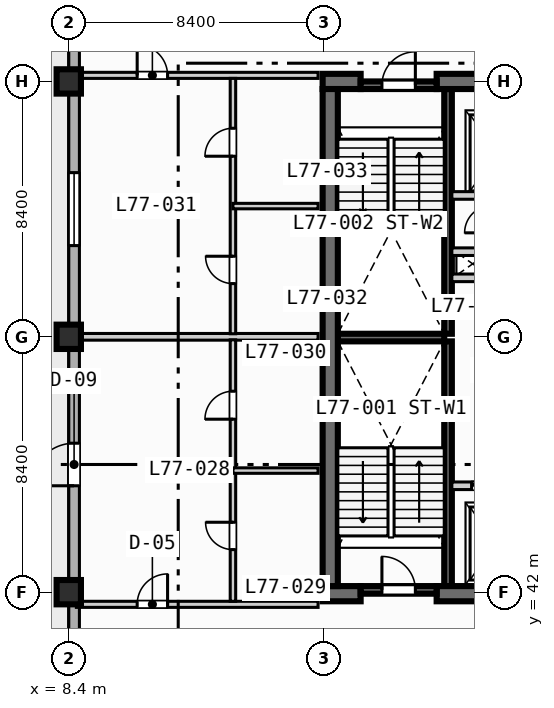
"""IFC4 building model, lengths in metres.
Left out: names, types, materials, properties, quantities, classifications, styles, units other than length and angle.
Written with IfcOpenShell. Run it as: python <this file> out.ifc"""

import sys

from ifc_helpers import new_model, si_unit, direction, frame, frame_2d, origin, origin_2d, place, context, subcontext, project, spatial, rectangle, extrude, element, fill, save


model = new_model("IFC4")
c1 = context("Model", 3, precision=1e-05, world=origin(), true_north=direction((0.0, 1.0)))
c2 = subcontext(c1, "Body", "Model", "MODEL_VIEW")
j1 = project(units=[si_unit("LENGTHUNIT", "METRE"), si_unit("PLANEANGLEUNIT", "RADIAN")], contexts=[c1])
p1 = place(None, origin())
s1 = spatial("IfcSite", under=j1, at=p1, CompositionType="ELEMENT")
p2 = place(p1, origin())
s2 = spatial("IfcBuilding", under=s1, at=p2, CompositionType="ELEMENT")
p3 = place(p2, frame((0.0, 0.0, 312.5)))
s3 = spatial("IfcBuildingStorey", under=s2, at=p3, CompositionType="ELEMENT", Elevation=312.5)
for number, where, z_axis, x_axis in (
    (1, (20.875, 42.2, 0.0), (0.0, 0.0, 1.0), (0.0, 1.0, 0.0)),
    (2, (20.875, 50.5, 0.0), (0.0, 0.0, 1.0), (0.0, 1.0, 0.0)),
):
    element("IfcWall", number, at=place(p3, frame(where, z_axis=z_axis, x_axis=x_axis)), inside=s3, PredefinedType="SOLIDWALL", context=c2, shape_type="SweptSolid", body=[
        extrude(rectangle(XDim=8.05, YDim=0.25, at=frame_2d((4.025, 0.0))), origin(), (0.0, 0.0, 1.0), 3.67),
    ])
p4 = place(p3, frame((17.25, 50.375, 0.0), z_axis=(0.0, 0.0, 1.0), x_axis=(1.0, 0.0, 0.0)))
e3 = element("IfcWall", 3, at=p4, inside=s3, PredefinedType="SOLIDWALL", context=c2, shape_type="SweptSolid", body=[
    extrude(rectangle(XDim=3.5, YDim=0.25, at=frame_2d((1.75, 0.0))), origin(), (0.0, 0.0, 1.0), 3.67),
])
p5 = place(p3, frame((16.75, 41.95, 0.0), z_axis=(0.0, 0.0, 1.0), x_axis=(1.0, 0.0, 0.0)))
e4 = element("IfcWall", 4, at=p5, inside=s3, PredefinedType="SHEAR", context=c2, shape_type="SweptSolid", body=[
    extrude(rectangle(XDim=1.25, YDim=0.5, at=frame_2d((0.625, 0.0))), origin(), (0.0, 0.0, 1.0), 3.67),
])
p6 = place(p3, frame((20.5, 41.95, 0.0), z_axis=(0.0, 0.0, 1.0), x_axis=(1.0, 0.0, 0.0)))
e5 = element("IfcWall", 5, at=p6, inside=s3, PredefinedType="SHEAR", context=c2, shape_type="SweptSolid", body=[
    extrude(rectangle(XDim=4.95, YDim=0.5, at=frame_2d((2.475, 0.0))), origin(), (0.0, 0.0, 1.0), 3.67),
])
p7 = place(p3, frame((16.75, 58.8, 0.0), z_axis=(0.0, 0.0, 1.0), x_axis=(1.0, 0.0, 0.0)))
e6 = element("IfcWall", 6, at=p7, inside=s3, PredefinedType="SHEAR", context=c2, shape_type="SweptSolid", body=[
    extrude(rectangle(XDim=1.25, YDim=0.5, at=frame_2d((0.625, 0.0))), origin(), (0.0, 0.0, 1.0), 3.67),
])
p8 = place(p3, frame((20.5, 58.8, 0.0), z_axis=(0.0, 0.0, 1.0), x_axis=(1.0, 0.0, 0.0)))
e7 = element("IfcWall", 7, at=p8, inside=s3, PredefinedType="SHEAR", context=c2, shape_type="SweptSolid", body=[
    extrude(rectangle(XDim=4.95, YDim=0.5, at=frame_2d((2.475, 0.0))), origin(), (0.0, 0.0, 1.0), 3.67),
])
p9 = place(p3, frame((17.0, 42.2, 0.0), z_axis=(0.0, 0.0, 1.0), x_axis=(0.0, 1.0, 0.0)))
e8 = element("IfcWall", 8, at=p9, inside=s3, PredefinedType="SHEAR", context=c2, shape_type="SweptSolid", body=[
    extrude(rectangle(XDim=16.35, YDim=0.5, at=frame_2d((8.175, 0.0))), origin(), (0.0, 0.0, 1.0), 3.67),
])
for number, where, z_axis, x_axis in (
    (9, (8.4, 42.0, 0.0), (0.0, 0.0, 1.0), (1.0, 0.0, 0.0)),
    (10, (8.4, 50.4, 0.0), (0.0, 0.0, 1.0), (1.0, 0.0, 0.0)),
    (11, (8.4, 58.8, 0.0), (0.0, 0.0, 1.0), (1.0, 0.0, 0.0)),
):
    element("IfcColumn", number, at=place(p3, frame(where, z_axis=z_axis, x_axis=x_axis)), inside=s3, PredefinedType="COLUMN", context=c2, shape_type="SweptSolid", body=[
        extrude(rectangle(XDim=0.8, YDim=0.8, at=origin_2d()), origin(), (0.0, 0.0, 1.0), 3.9),
    ])
p10 = place(p3, frame((8.575, 11.575, 0.0), z_axis=(0.0, 0.0, 1.0), x_axis=(0.0, 1.0, 0.0)))
e12 = element("IfcWall", 12, at=p10, inside=s3, PredefinedType="STANDARD", context=c2, shape_type="SweptSolid", body=[
    extrude(rectangle(XDim=60.85, YDim=0.35, at=frame_2d((30.425, 0.0))), origin(), (0.0, 0.0, 1.0), 3.67),
])
p11 = place(p10, frame((33.925, 0.0, 0.0)))
e13 = element("IfcOpeningElement", 13, at=p11, cuts=e12, PredefinedType="OPENING", context=c2, shape_type="SweptSolid", body=[
    extrude(rectangle(XDim=1.4, YDim=2.2, at=frame_2d((0.7, 1.1))), frame((0.0, 0.185, 0.0), z_axis=(0.0, -1.0, 0.0), x_axis=(1.0, 0.0, 0.0)), (0.0, 0.0, 1.0), 0.37),
])
p12 = place(p10, frame((25.025, 0.0, 0.85)))
e14 = element("IfcOpeningElement", 14, at=p12, cuts=e12, PredefinedType="OPENING", context=c2, shape_type="SweptSolid", body=[
    extrude(rectangle(XDim=2.4, YDim=1.95, at=frame_2d((1.2, 0.975))), frame((0.0, 0.185, 0.0), z_axis=(0.0, -1.0, 0.0), x_axis=(1.0, 0.0, 0.0)), (0.0, 0.0, 1.0), 0.37),
])
p13 = place(p10, frame((41.825, 0.0, 0.85)))
e15 = element("IfcOpeningElement", 15, at=p13, cuts=e12, PredefinedType="OPENING", context=c2, shape_type="SweptSolid", body=[
    extrude(rectangle(XDim=2.4, YDim=1.95, at=frame_2d((1.2, 0.975))), frame((0.0, 0.185, 0.0), z_axis=(0.0, -1.0, 0.0), x_axis=(1.0, 0.0, 0.0)), (0.0, 0.0, 1.0), 0.37),
])
p14 = place(p10, frame((19.25, 0.0, 0.85)))
e16 = element("IfcOpeningElement", 16, at=p14, cuts=e12, PredefinedType="OPENING", context=c2, shape_type="SweptSolid", body=[
    extrude(rectangle(XDim=1.8, YDim=1.8, at=frame_2d((0.9, 0.9))), frame((0.0, 0.185, 0.0), z_axis=(0.0, -1.0, 0.0), x_axis=(1.0, 0.0, 0.0)), (0.0, 0.0, 1.0), 0.37),
])
p15 = place(p3, frame((18.0, 42.075, 0.0), z_axis=(0.0, 0.0, 1.0), x_axis=(1.0, 0.0, 0.0)))
e17 = element("IfcWall", 17, at=p15, inside=s3, PredefinedType="SOLIDWALL", context=c2, shape_type="SweptSolid", body=[
    extrude(rectangle(XDim=2.5, YDim=0.25, at=frame_2d((1.25, 0.0))), origin(), (0.0, 0.0, 1.0), 3.67),
])
p16 = place(p15, frame((0.7, 0.0, 0.0)))
e18 = element("IfcOpeningElement", 18, at=p16, cuts=e17, PredefinedType="OPENING", context=c2, shape_type="SweptSolid", body=[
    extrude(rectangle(XDim=1.1, YDim=2.15, at=frame_2d((0.55, 1.075))), frame((0.0, 0.135, 0.0), z_axis=(0.0, -1.0, 0.0), x_axis=(1.0, 0.0, 0.0)), (0.0, 0.0, 1.0), 0.27),
])
p17 = place(p3, frame((18.0, 58.675, 0.0), z_axis=(0.0, 0.0, 1.0), x_axis=(1.0, 0.0, 0.0)))
e19 = element("IfcWall", 19, at=p17, inside=s3, PredefinedType="SOLIDWALL", context=c2, shape_type="SweptSolid", body=[
    extrude(rectangle(XDim=2.5, YDim=0.25, at=frame_2d((1.25, 0.0))), origin(), (0.0, 0.0, 1.0), 3.67),
])
p18 = place(p17, frame((0.7, 0.0, 0.0)))
e20 = element("IfcOpeningElement", 20, at=p18, cuts=e19, PredefinedType="OPENING", context=c2, shape_type="SweptSolid", body=[
    extrude(rectangle(XDim=1.1, YDim=2.15, at=frame_2d((0.55, 1.075))), frame((0.0, 0.135, 0.0), z_axis=(0.0, -1.0, 0.0), x_axis=(1.0, 0.0, 0.0)), (0.0, 0.0, 1.0), 0.27),
])
p19 = place(p3, frame((21.0, 45.5, 0.0), z_axis=(0.0, 0.0, 1.0), x_axis=(1.0, 0.0, 0.0)))
e21 = element("IfcWall", 21, at=p19, inside=s3, PredefinedType="SOLIDWALL", context=c2, shape_type="SweptSolid", body=[
    extrude(rectangle(XDim=4.15, YDim=0.25, at=frame_2d((2.075, 0.0))), origin(), (0.0, 0.0, 1.0), 3.67),
])
p20 = place(p19, frame((0.65, 0.0, 0.0)))
e22 = element("IfcOpeningElement", 22, at=p20, cuts=e21, PredefinedType="OPENING", context=c2, shape_type="SweptSolid", body=[
    extrude(rectangle(XDim=1.1, YDim=2.15, at=frame_2d((0.55, 1.075))), frame((0.0, 0.135, 0.0), z_axis=(0.0, -1.0, 0.0), x_axis=(1.0, 0.0, 0.0)), (0.0, 0.0, 1.0), 0.27),
])
p21 = place(p3, frame((21.0, 52.34, 0.0), z_axis=(0.0, 0.0, 1.0), x_axis=(1.0, 0.0, 0.0)))
e23 = element("IfcWall", 23, at=p21, inside=s3, PredefinedType="SOLIDWALL", context=c2, shape_type="SweptSolid", body=[
    extrude(rectangle(XDim=3.95, YDim=0.25, at=frame_2d((1.975, 0.0))), origin(), (0.0, 0.0, 1.0), 3.67),
])
p22 = place(p3, frame((21.0, 55.05, 0.0), z_axis=(0.0, 0.0, 1.0), x_axis=(1.0, 0.0, 0.0)))
e24 = element("IfcWall", 24, at=p22, inside=s3, PredefinedType="SOLIDWALL", context=c2, shape_type="SweptSolid", body=[
    extrude(rectangle(XDim=4.15, YDim=0.25, at=frame_2d((2.075, 0.0))), origin(), (0.0, 0.0, 1.0), 3.67),
])
p23 = place(p22, frame((1.85, 0.0, 0.0)))
e25 = element("IfcOpeningElement", 25, at=p23, cuts=e24, PredefinedType="OPENING", context=c2, shape_type="SweptSolid", body=[
    extrude(rectangle(XDim=1.1, YDim=2.15, at=frame_2d((0.55, 1.075))), frame((0.0, 0.135, 0.0), z_axis=(0.0, -1.0, 0.0), x_axis=(1.0, 0.0, 0.0)), (0.0, 0.0, 1.0), 0.27),
])
p24 = place(p3, frame((21.0, 53.2, 0.0), z_axis=(0.0, 0.0, 1.0), x_axis=(1.0, 0.0, 0.0)))
e26 = element("IfcWall", 26, at=p24, inside=s3, PredefinedType="SOLIDWALL", context=c2, shape_type="SweptSolid", body=[
    extrude(rectangle(XDim=1.3, YDim=0.25, at=frame_2d((0.65, 0.0))), origin(), (0.0, 0.0, 1.0), 3.67),
])
p25 = place(p3, frame((8.65, 41.6, 0.0), z_axis=(0.0, 0.0, 1.0), x_axis=(1.0, 0.0, 0.0)))
e27 = element("IfcWall", 27, at=p25, inside=s3, PredefinedType="PARTITIONING", context=c2, shape_type="SweptSolid", body=[
    extrude(rectangle(XDim=7.95, YDim=0.2, at=frame_2d((3.975, 0.0))), origin(), (0.0, 0.0, 1.0), 3.67),
])
p26 = place(p25, frame((2.0, 0.0, 0.0)))
e28 = element("IfcOpeningElement", 28, at=p26, cuts=e27, PredefinedType="OPENING", context=c2, shape_type="SweptSolid", body=[
    extrude(rectangle(XDim=1.0, YDim=2.15, at=frame_2d((0.5, 1.075))), frame((0.0, 0.11, 0.0), z_axis=(0.0, -1.0, 0.0), x_axis=(1.0, 0.0, 0.0)), (0.0, 0.0, 1.0), 0.22),
])
p27 = place(p3, frame((8.65, 59.0, 0.0), z_axis=(0.0, 0.0, 1.0), x_axis=(1.0, 0.0, 0.0)))
e29 = element("IfcWall", 29, at=p27, inside=s3, PredefinedType="PARTITIONING", context=c2, shape_type="SweptSolid", body=[
    extrude(rectangle(XDim=7.95, YDim=0.2, at=frame_2d((3.975, 0.0))), origin(), (0.0, 0.0, 1.0), 3.207),
])
p28 = place(p27, frame((2.0, 0.0, 0.0)))
e30 = element("IfcOpeningElement", 30, at=p28, cuts=e29, PredefinedType="OPENING", context=c2, shape_type="SweptSolid", body=[
    extrude(rectangle(XDim=1.0, YDim=2.15, at=frame_2d((0.5, 1.075))), frame((0.0, 0.11, 0.0), z_axis=(0.0, -1.0, 0.0), x_axis=(1.0, 0.0, 0.0)), (0.0, 0.0, 1.0), 0.22),
])
p29 = place(p3, frame((8.65, 50.4, 0.0), z_axis=(0.0, 0.0, 1.0), x_axis=(1.0, 0.0, 0.0)))
e31 = element("IfcWall", 31, at=p29, inside=s3, PredefinedType="PARTITIONING", context=c2, shape_type="SweptSolid", body=[
    extrude(rectangle(XDim=7.95, YDim=0.22, at=frame_2d((3.975, 0.0))), origin(), (0.0, 0.0, 1.0), 3.07),
])
p30 = place(p3, frame((13.8, 41.7, 0.0), z_axis=(0.0, 0.0, 1.0), x_axis=(0.0, 1.0, 0.0)))
e32 = element("IfcWall", 32, at=p30, inside=s3, PredefinedType="PLUMBINGWALL", context=c2, shape_type="SweptSolid", body=[
    extrude(rectangle(XDim=8.6, YDim=0.18, at=frame_2d((4.3, 0.0))), origin(), (0.0, 0.0, 1.0), 3.67),
])
p31 = place(p30, frame((1.7, 0.0, 0.0)))
e33 = element("IfcOpeningElement", 33, at=p31, cuts=e32, PredefinedType="OPENING", context=c2, shape_type="SweptSolid", body=[
    extrude(rectangle(XDim=0.9, YDim=2.1, at=frame_2d((0.45, 1.05))), frame((0.0, 0.1, 0.0), z_axis=(0.0, -1.0, 0.0), x_axis=(1.0, 0.0, 0.0)), (0.0, 0.0, 1.0), 0.2),
])
p32 = place(p30, frame((5.99, 0.0, 0.0)))
e34 = element("IfcOpeningElement", 34, at=p32, cuts=e32, PredefinedType="OPENING", context=c2, shape_type="SweptSolid", body=[
    extrude(rectangle(XDim=0.92, YDim=2.1, at=frame_2d((0.46, 1.05))), frame((0.0, 0.1, 0.0), z_axis=(0.0, -1.0, 0.0), x_axis=(1.0, 0.0, 0.0)), (0.0, 0.0, 1.0), 0.2),
])
p33 = place(p3, frame((13.8, 46.0, 0.0), z_axis=(0.0, 0.0, 1.0), x_axis=(1.0, 0.0, 0.0)))
e35 = element("IfcWall", 35, at=p33, inside=s3, PredefinedType="PLUMBINGWALL", context=c2, shape_type="SweptSolid", body=[
    extrude(rectangle(XDim=2.8, YDim=0.18, at=frame_2d((1.4, 0.0))), origin(), (0.0, 0.0, 1.0), 3.67),
])
p34 = place(p3, frame((13.8, 50.5, 0.0), z_axis=(0.0, 0.0, 1.0), x_axis=(0.0, 1.0, 0.0)))
e36 = element("IfcWall", 36, at=p34, inside=s3, PredefinedType="PLUMBINGWALL", context=c2, shape_type="SweptSolid", body=[
    extrude(rectangle(XDim=8.4, YDim=0.18, at=frame_2d((4.2, 0.0))), origin(), (0.0, 0.0, 1.0), 3.67),
])
p35 = place(p34, frame((1.65, 0.0, 0.0)))
e37 = element("IfcOpeningElement", 37, at=p35, cuts=e36, PredefinedType="OPENING", context=c2, shape_type="SweptSolid", body=[
    extrude(rectangle(XDim=0.9, YDim=2.1, at=frame_2d((0.45, 1.05))), frame((0.0, 0.1, 0.0), z_axis=(0.0, -1.0, 0.0), x_axis=(1.0, 0.0, 0.0)), (0.0, 0.0, 1.0), 0.2),
])
p36 = place(p34, frame((5.84, 0.0, 0.0)))
e38 = element("IfcOpeningElement", 38, at=p36, cuts=e36, PredefinedType="OPENING", context=c2, shape_type="SweptSolid", body=[
    extrude(rectangle(XDim=0.92, YDim=2.1, at=frame_2d((0.46, 1.05))), frame((0.0, 0.1, 0.0), z_axis=(0.0, -1.0, 0.0), x_axis=(1.0, 0.0, 0.0)), (0.0, 0.0, 1.0), 0.2),
])
p37 = place(p3, frame((13.8, 54.7, 0.0), z_axis=(0.0, 0.0, 1.0), x_axis=(1.0, 0.0, 0.0)))
e39 = element("IfcWall", 39, at=p37, inside=s3, PredefinedType="PLUMBINGWALL", context=c2, shape_type="SweptSolid", body=[
    extrude(rectangle(XDim=2.8, YDim=0.18, at=frame_2d((1.4, 0.0))), origin(), (0.0, 0.0, 1.0), 3.67),
])
p38 = place(p11, origin())
e40 = element("IfcDoor", 40, at=p38, inside=s3, OperationType="SINGLE_SWING_LEFT", PredefinedType="DOOR", context=c2, shape_type="SweptSolid", body=[
    extrude(rectangle(XDim=1.4, YDim=2.2, at=frame_2d((0.7, 1.1))), frame((0.0, 0.025, 0.0), z_axis=(0.0, -1.0, 0.0), x_axis=(1.0, 0.0, 0.0)), (0.0, 0.0, 1.0), 0.05),
])
fill(e13, e40)
p39 = place(p13, origin())
e41 = element("IfcWindow", 41, at=p39, inside=s3, PartitioningType="SINGLE_PANEL", PredefinedType="WINDOW", context=c2, shape_type="SweptSolid", body=[
    extrude(rectangle(XDim=2.4, YDim=1.95, at=frame_2d((1.2, 0.975))), frame((0.0, 0.03, 0.0), z_axis=(0.0, -1.0, 0.0), x_axis=(1.0, 0.0, 0.0)), (0.0, 0.0, 1.0), 0.06),
])
fill(e15, e41)
p40 = place(p16, origin())
e42 = element("IfcDoor", 42, at=p40, inside=s3, OperationType="SINGLE_SWING_LEFT", PredefinedType="DOOR", context=c2, shape_type="SweptSolid", body=[
    extrude(rectangle(XDim=1.1, YDim=2.15, at=frame_2d((0.55, 1.075))), frame((0.0, 0.025, 0.0), z_axis=(0.0, -1.0, 0.0), x_axis=(1.0, 0.0, 0.0)), (0.0, 0.0, 1.0), 0.05),
])
fill(e18, e42)
p41 = place(p18, origin())
e43 = element("IfcDoor", 43, at=p41, inside=s3, OperationType="SINGLE_SWING_RIGHT", PredefinedType="DOOR", context=c2, shape_type="SweptSolid", body=[
    extrude(rectangle(XDim=1.1, YDim=2.15, at=frame_2d((0.55, 1.075))), frame((0.0, 0.025, 0.0), z_axis=(0.0, -1.0, 0.0), x_axis=(1.0, 0.0, 0.0)), (0.0, 0.0, 1.0), 0.05),
])
fill(e20, e43)
p42 = place(p20, origin())
e44 = element("IfcDoor", 44, at=p42, inside=s3, OperationType="SLIDING_TO_LEFT", PredefinedType="DOOR", context=c2, shape_type="SweptSolid", body=[
    extrude(rectangle(XDim=1.1, YDim=2.15, at=frame_2d((0.55, 1.075))), frame((0.0, 0.025, 0.0), z_axis=(0.0, -1.0, 0.0), x_axis=(1.0, 0.0, 0.0)), (0.0, 0.0, 1.0), 0.05),
])
fill(e22, e44)
p43 = place(p26, origin())
e45 = element("IfcDoor", 45, at=p43, inside=s3, OperationType="SINGLE_SWING_RIGHT", PredefinedType="DOOR", context=c2, shape_type="SweptSolid", body=[
    extrude(rectangle(XDim=1.0, YDim=2.15, at=frame_2d((0.5, 1.075))), frame((0.0, 0.025, 0.0), z_axis=(0.0, -1.0, 0.0), x_axis=(1.0, 0.0, 0.0)), (0.0, 0.0, 1.0), 0.05),
])
fill(e28, e45)
p44 = place(p28, origin())
e46 = element("IfcDoor", 46, at=p44, inside=s3, OperationType="SINGLE_SWING_LEFT", PredefinedType="DOOR", context=c2, shape_type="SweptSolid", body=[
    extrude(rectangle(XDim=1.0, YDim=2.15, at=frame_2d((0.5, 1.075))), frame((0.0, 0.025, 0.0), z_axis=(0.0, -1.0, 0.0), x_axis=(1.0, 0.0, 0.0)), (0.0, 0.0, 1.0), 0.05),
])
fill(e30, e46)
p45 = place(p31, origin())
e47 = element("IfcDoor", 47, at=p45, inside=s3, OperationType="SINGLE_SWING_RIGHT", PredefinedType="DOOR", context=c2, shape_type="SweptSolid", body=[
    extrude(rectangle(XDim=0.9, YDim=2.1, at=frame_2d((0.45, 1.05))), frame((0.0, 0.025, 0.0), z_axis=(0.0, -1.0, 0.0), x_axis=(1.0, 0.0, 0.0)), (0.0, 0.0, 1.0), 0.05),
])
fill(e33, e47)
p46 = place(p32, origin())
e48 = element("IfcDoor", 48, at=p46, inside=s3, OperationType="SINGLE_SWING_LEFT", PredefinedType="DOOR", context=c2, shape_type="SweptSolid", body=[
    extrude(rectangle(XDim=0.92, YDim=2.1, at=frame_2d((0.46, 1.05))), frame((0.0, 0.025, 0.0), z_axis=(0.0, -1.0, 0.0), x_axis=(1.0, 0.0, 0.0)), (0.0, 0.0, 1.0), 0.05),
])
fill(e34, e48)
p47 = place(p35, origin())
e49 = element("IfcDoor", 49, at=p47, inside=s3, OperationType="SINGLE_SWING_RIGHT", PredefinedType="DOOR", context=c2, shape_type="SweptSolid", body=[
    extrude(rectangle(XDim=0.9, YDim=2.1, at=frame_2d((0.45, 1.05))), frame((0.0, 0.025, 0.0), z_axis=(0.0, -1.0, 0.0), x_axis=(1.0, 0.0, 0.0)), (0.0, 0.0, 1.0), 0.05),
])
fill(e37, e49)
p48 = place(p36, origin())
e50 = element("IfcDoor", 50, at=p48, inside=s3, OperationType="SINGLE_SWING_LEFT", PredefinedType="DOOR", context=c2, shape_type="SweptSolid", body=[
    extrude(rectangle(XDim=0.92, YDim=2.1, at=frame_2d((0.46, 1.05))), frame((0.0, 0.025, 0.0), z_axis=(0.0, -1.0, 0.0), x_axis=(1.0, 0.0, 0.0)), (0.0, 0.0, 1.0), 0.05),
])
fill(e38, e50)
save(model, sys.argv[1])
